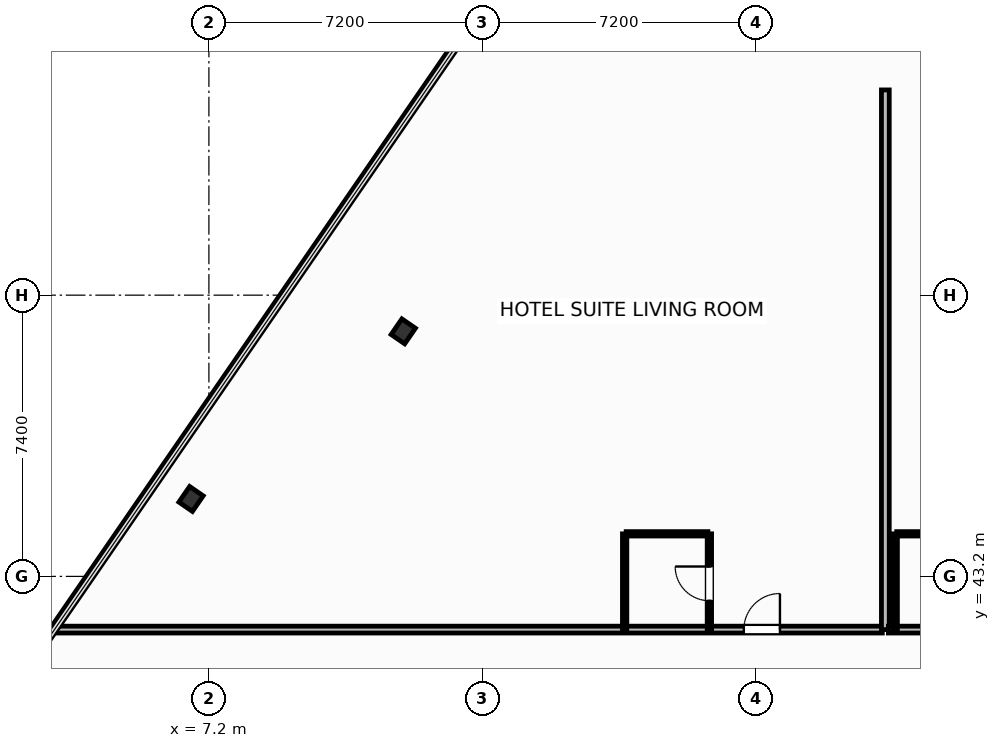
"""IFC4 building model, lengths in metres.
Left out: names, types, materials, properties, quantities, classifications, styles, units other than length and angle.
Written with IfcOpenShell. Run it as: python <this file> out.ifc"""

import sys

from ifc_helpers import new_model, si_unit, direction, frame, frame_2d, origin, origin_2d, place, context, subcontext, project, spatial, rectangle, i_section, extrude, element, fill, save


model = new_model("IFC4")
c1 = context("Model", 3, precision=1e-05, world=origin(), true_north=direction((0.0, 1.0)))
c2 = subcontext(c1, "Body", "Model", "MODEL_VIEW")
j1 = project(units=[si_unit("LENGTHUNIT", "METRE"), si_unit("PLANEANGLEUNIT", "RADIAN")], contexts=[c1])
p1 = place(None, origin())
s1 = spatial("IfcSite", under=j1, at=p1, CompositionType="ELEMENT")
p2 = place(p1, origin())
s2 = spatial("IfcBuilding", under=s1, at=p2, CompositionType="ELEMENT")
p3 = place(p2, frame((0.0, 0.0, 60.3)))
s3 = spatial("IfcBuildingStorey", under=s2, at=p3, CompositionType="ELEMENT", Elevation=60.3)
for number, where, z_axis, x_axis in (
    (1, (12.315, 49.647, 0.0), (0.0, 0.0, 1.0), (0.824, -0.567, 0.0)),
    (2, (6.73, 45.238, 0.0), (0.0, 0.0, 1.0), (0.824, -0.567, 0.0)),
):
    element("IfcColumn", number, at=place(p3, frame(where, z_axis=z_axis, x_axis=x_axis)), inside=s3, PredefinedType="COLUMN", context=c2, shape_type="SweptSolid", body=[
        extrude(i_section(OverallWidth=0.432, OverallDepth=0.498, WebThickness=0.056, FlangeThickness=0.089, FilletRadius=0.025, at=origin_2d()), origin(), (0.0, 0.0, 1.0), 3.7),
    ])
p4 = place(p3, frame((44.882, 51.962, 0.0), z_axis=(0.0, 0.0, 1.0), x_axis=(-0.823534427573, 0.567266292497, 0.0)))
e3 = element("IfcWall", 3, at=p4, inside=s3, PredefinedType="SOLIDWALL", context=c2, shape_type="SweptSolid", body=[
    extrude(rectangle(XDim=23.147, YDim=0.22, at=frame_2d((11.574, 0.0))), origin(), (0.0, 0.0, 1.0), 2.73),
])
p5 = place(p4, frame((10.749, 0.0, 0.8)))
e4 = element("IfcOpeningElement", 4, at=p5, cuts=e3, PredefinedType="OPENING", context=c2, shape_type="SweptSolid", body=[
    extrude(rectangle(XDim=1.65, YDim=1.65, at=frame_2d((0.825, 0.825))), frame((0.0, 0.12, 0.0), z_axis=(0.0, -1.0, 0.0), x_axis=(1.0, 0.0, 0.0)), (0.0, 0.0, 1.0), 0.24),
])
p6 = place(p3, frame((3.176, 41.8, 0.0), z_axis=(0.0, 0.0, 1.0), x_axis=(1.0, 0.0, 0.0)))
e5 = element("IfcWall", 5, at=p6, inside=s3, PredefinedType="PARTITIONING", context=c2, shape_type="SweptSolid", body=[
    extrude(rectangle(XDim=21.744, YDim=0.18, at=frame_2d((10.872, 0.0))), origin(), (0.0, 0.0, 1.0), 3.45),
])
p7 = place(p6, frame((18.101, 0.0, 0.0)))
e6 = element("IfcOpeningElement", 6, at=p7, cuts=e5, PredefinedType="OPENING", context=c2, shape_type="SweptSolid", body=[
    extrude(rectangle(XDim=0.95, YDim=2.15, at=frame_2d((0.475, 1.075))), frame((0.0, 0.1, 0.0), z_axis=(0.0, -1.0, 0.0), x_axis=(1.0, 0.0, 0.0)), (0.0, 0.0, 1.0), 0.2),
])
p8 = place(p3, frame((18.18, 44.32, 0.0), z_axis=(0.0, 0.0, 1.0), x_axis=(1.0, 0.0, 0.0)))
e7 = element("IfcWall", 7, at=p8, inside=s3, PredefinedType="PARTITIONING", context=c2, shape_type="SweptSolid", body=[
    extrude(rectangle(XDim=2.15, YDim=0.115, at=frame_2d((1.075, 0.0))), origin(), (0.0, 0.0, 1.0), 3.45),
])
p9 = place(p3, frame((20.37, 41.8, 0.0), z_axis=(0.0, 0.0, 1.0), x_axis=(0.0, 1.0, 0.0)))
e8 = element("IfcWall", 8, at=p9, inside=s3, PredefinedType="PARTITIONING", context=c2, shape_type="SweptSolid", body=[
    extrude(rectangle(XDim=2.52, YDim=0.115, at=frame_2d((1.26, 0.0))), origin(), (0.0, 0.0, 1.0), 3.45),
])
p10 = place(p9, frame((0.76, 0.0, 0.0)))
e9 = element("IfcOpeningElement", 9, at=p10, cuts=e8, PredefinedType="OPENING", context=c2, shape_type="SweptSolid", body=[
    extrude(rectangle(XDim=0.9, YDim=2.05, at=frame_2d((0.45, 1.025))), frame((0.0, 0.067, 0.0), z_axis=(0.0, -1.0, 0.0), x_axis=(1.0, 0.0, 0.0)), (0.0, 0.0, 1.0), 0.135),
])
p11 = place(p3, frame((18.14, 41.8, 0.0), z_axis=(0.0, 0.0, 1.0), x_axis=(0.0, 1.0, 0.0)))
e10 = element("IfcWall", 10, at=p11, inside=s3, PredefinedType="PARTITIONING", context=c2, shape_type="SweptSolid", body=[
    extrude(rectangle(XDim=2.52, YDim=0.115, at=frame_2d((1.26, 0.0))), origin(), (0.0, 0.0, 1.0), 3.45),
])
p12 = place(p3, frame((25.0, 41.8, 0.0), z_axis=(0.0, 0.0, 1.0), x_axis=(0.0, 1.0, 0.0)))
e11 = element("IfcWall", 11, at=p12, inside=s3, PredefinedType="PARTITIONING", context=c2, shape_type="SweptSolid", body=[
    extrude(rectangle(XDim=14.2, YDim=0.205, at=frame_2d((7.1, 0.0))), origin(), (0.0, 0.0, 1.0), 3.45),
])
p13 = place(p3, frame((25.08, 41.8, 0.0), z_axis=(0.0, 0.0, 1.0), x_axis=(1.0, 0.0, 0.0)))
e12 = element("IfcWall", 12, at=p13, inside=s3, PredefinedType="PARTITIONING", context=c2, shape_type="SweptSolid", body=[
    extrude(rectangle(XDim=6.34, YDim=0.18, at=frame_2d((3.17, 0.0))), origin(), (0.0, 0.0, 1.0), 3.45),
])
p14 = place(p13, frame((3.274, 0.0, 0.0)))
e13 = element("IfcOpeningElement", 13, at=p14, cuts=e12, PredefinedType="OPENING", context=c2, shape_type="SweptSolid", body=[
    extrude(rectangle(XDim=0.95, YDim=2.15, at=frame_2d((0.475, 1.075))), frame((0.0, 0.1, 0.0), z_axis=(0.0, -1.0, 0.0), x_axis=(1.0, 0.0, 0.0)), (0.0, 0.0, 1.0), 0.2),
])
p15 = place(p3, frame((25.3, 44.32, 0.0), z_axis=(0.0, 0.0, 1.0), x_axis=(1.0, 0.0, 0.0)))
e14 = element("IfcWall", 14, at=p15, inside=s3, PredefinedType="PARTITIONING", context=c2, shape_type="SweptSolid", body=[
    extrude(rectangle(XDim=2.124, YDim=0.115, at=frame_2d((1.062, 0.0))), origin(), (0.0, 0.0, 1.0), 3.45),
])
p16 = place(p3, frame((25.26, 41.8, 0.0), z_axis=(0.0, 0.0, 1.0), x_axis=(0.0, 1.0, 0.0)))
e15 = element("IfcWall", 15, at=p16, inside=s3, PredefinedType="PARTITIONING", context=c2, shape_type="SweptSolid", body=[
    extrude(rectangle(XDim=2.52, YDim=0.115, at=frame_2d((1.26, 0.0))), origin(), (0.0, 0.0, 1.0), 3.45),
])
p17 = place(p7, origin())
e16 = element("IfcDoor", 16, at=p17, inside=s3, OperationType="SINGLE_SWING_RIGHT", PredefinedType="DOOR", context=c2, shape_type="SweptSolid", body=[
    extrude(rectangle(XDim=0.95, YDim=2.15, at=frame_2d((0.475, 1.075))), frame((0.0, 0.025, 0.0), z_axis=(0.0, -1.0, 0.0), x_axis=(1.0, 0.0, 0.0)), (0.0, 0.0, 1.0), 0.05),
])
fill(e6, e16)
p18 = place(p10, origin())
e17 = element("IfcDoor", 17, at=p18, inside=s3, OperationType="SINGLE_SWING_RIGHT", PredefinedType="DOOR", context=c2, shape_type="SweptSolid", body=[
    extrude(rectangle(XDim=0.9, YDim=2.05, at=frame_2d((0.45, 1.025))), frame((0.0, 0.025, 0.0), z_axis=(0.0, -1.0, 0.0), x_axis=(1.0, 0.0, 0.0)), (0.0, 0.0, 1.0), 0.05),
])
fill(e9, e17)
save(model, sys.argv[1])
